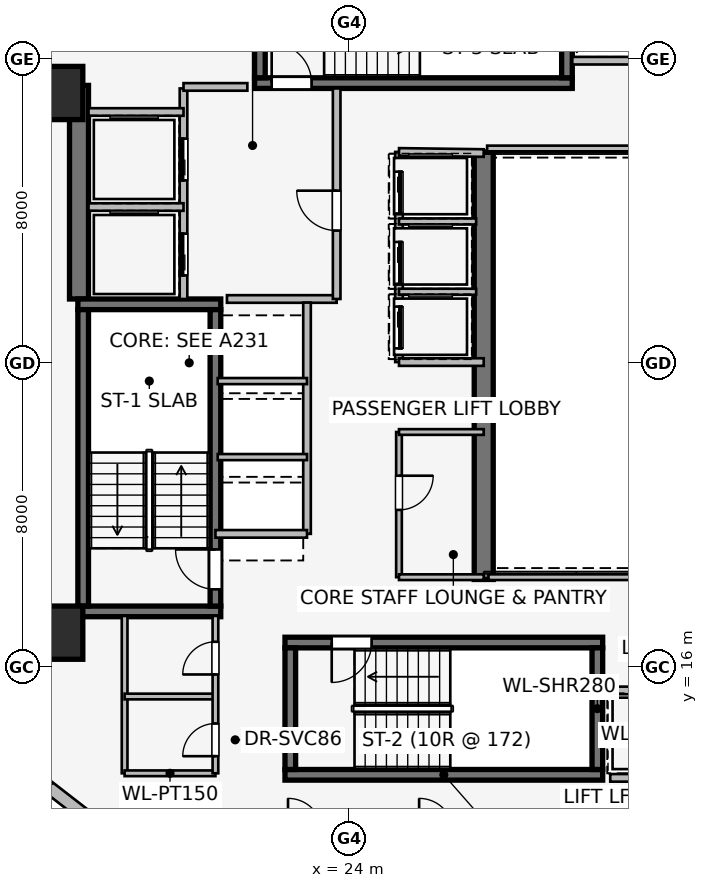
"""IFC4 building model, lengths in metres.
Left out: names, types, materials, properties, quantities, classifications, styles, units other than length and angle.
Written with IfcOpenShell. Run it as: python <this file> out.ifc"""

import sys

from ifc_helpers import new_model, si_unit, direction, frame, frame_2d, origin, origin_2d, place, context, subcontext, project, spatial, rectangle, extrude, element, fill, save


model = new_model("IFC4")
c1 = context("Model", 3, precision=1e-05, world=origin(), true_north=direction((0.0, 1.0)))
c2 = subcontext(c1, "Body", "Model", "MODEL_VIEW")
j1 = project(units=[si_unit("LENGTHUNIT", "METRE"), si_unit("PLANEANGLEUNIT", "RADIAN")], contexts=[c1])
p1 = place(None, origin())
s1 = spatial("IfcSite", under=j1, at=p1, CompositionType="ELEMENT")
p2 = place(p1, origin())
s2 = spatial("IfcBuilding", under=s1, at=p2, CompositionType="ELEMENT")
p3 = place(p2, frame((0.0, 0.0, 111.9)))
s3 = spatial("IfcBuildingStorey", under=s2, at=p3, CompositionType="ELEMENT", Elevation=111.9)
p4 = place(p3, frame((16.9, 25.68, 0.0), z_axis=(0.0, 0.0, 1.0), x_axis=(0.0, 1.0, 0.0)))
e1 = element("IfcWall", 1, at=p4, inside=s3, PredefinedType="SHEAR", context=c2, shape_type="SweptSolid", body=[
    extrude(rectangle(XDim=5.62, YDim=0.5, at=frame_2d((2.81, 0.0))), origin(), (0.0, 0.0, 1.0), 3.45),
])
p5 = place(p3, frame((27.55, 29.55, 0.0), z_axis=(0.0, 0.0, 1.0), x_axis=(0.0, -1.0, 0.0)))
e2 = element("IfcWall", 2, at=p5, inside=s3, PredefinedType="SHEAR", context=c2, shape_type="SweptSolid", body=[
    extrude(rectangle(XDim=11.25, YDim=0.5, at=frame_2d((5.625, 0.0))), origin(), (0.0, 0.0, 1.0), 3.45),
])
for number, where, z_axis, x_axis in (
    (3, (16.87, 17.46, 0.0), (0.0, 0.0, 1.0), (1.0, 0.0, 0.0)),
    (4, (20.63, 25.54, 0.0), (0.0, 0.0, 1.0), (-1.0, 0.0, 0.0)),
):
    element("IfcWall", number, at=place(p3, frame(where, z_axis=z_axis, x_axis=x_axis)), inside=s3, PredefinedType="SHEAR", context=c2, shape_type="SweptSolid", body=[
        extrude(rectangle(XDim=3.76, YDim=0.28, at=frame_2d((1.88, 0.0))), origin(), (0.0, 0.0, 1.0), 3.45),
    ])
p6 = place(p3, frame((17.01, 25.4, 0.0), z_axis=(0.0, 0.0, 1.0), x_axis=(0.0, -1.0, 0.0)))
e5 = element("IfcWall", 5, at=p6, inside=s3, PredefinedType="SHEAR", context=c2, shape_type="SweptSolid", body=[
    extrude(rectangle(XDim=7.8, YDim=0.28, at=frame_2d((3.9, 0.0))), origin(), (0.0, 0.0, 1.0), 3.45),
])
p7 = place(p3, frame((20.49, 17.6, 0.0), z_axis=(0.0, 0.0, 1.0), x_axis=(0.0, 1.0, 0.0)))
e6 = element("IfcWall", 6, at=p7, inside=s3, PredefinedType="SHEAR", context=c2, shape_type="SweptSolid", body=[
    extrude(rectangle(XDim=7.8, YDim=0.28, at=frame_2d((3.9, 0.0))), origin(), (0.0, 0.0, 1.0), 3.45),
])
p8 = place(p7, frame((0.44, 0.0, 0.0)))
e7 = element("IfcOpeningElement", 7, at=p8, cuts=e6, PredefinedType="OPENING", context=c2, shape_type="SweptSolid", body=[
    extrude(rectangle(XDim=1.05, YDim=2.0, at=frame_2d((0.525, 1.0))), frame((0.0, 0.15, 0.0), z_axis=(0.0, -1.0, 0.0), x_axis=(1.0, 0.0, 0.0)), (0.0, 0.0, 1.0), 0.3),
])
p9 = place(p3, frame((22.32, 13.16, 0.0), z_axis=(0.0, 0.0, 1.0), x_axis=(1.0, 0.0, 0.0)))
e8 = element("IfcWall", 8, at=p9, inside=s3, PredefinedType="SHEAR", context=c2, shape_type="SweptSolid", body=[
    extrude(rectangle(XDim=8.36, YDim=0.28, at=frame_2d((4.18, 0.0))), origin(), (0.0, 0.0, 1.0), 3.45),
])
p10 = place(p3, frame((30.68, 16.64, 0.0), z_axis=(0.0, 0.0, 1.0), x_axis=(-1.0, 0.0, 0.0)))
e9 = element("IfcWall", 9, at=p10, inside=s3, PredefinedType="SHEAR", context=c2, shape_type="SweptSolid", body=[
    extrude(rectangle(XDim=8.36, YDim=0.28, at=frame_2d((4.18, 0.0))), origin(), (0.0, 0.0, 1.0), 3.45),
])
p11 = place(p10, frame((6.08, 0.0, 0.0)))
e10 = element("IfcOpeningElement", 10, at=p11, cuts=e9, PredefinedType="OPENING", context=c2, shape_type="SweptSolid", body=[
    extrude(rectangle(XDim=1.05, YDim=2.0, at=frame_2d((0.525, 1.0))), frame((0.0, 0.15, 0.0), z_axis=(0.0, -1.0, 0.0), x_axis=(1.0, 0.0, 0.0)), (0.0, 0.0, 1.0), 0.3),
])
for number, where, z_axis, x_axis in (
    (11, (22.46, 16.5, 0.0), (0.0, 0.0, 1.0), (0.0, -1.0, 0.0)),
    (12, (30.54, 13.3, 0.0), (0.0, 0.0, 1.0), (0.0, 1.0, 0.0)),
):
    element("IfcWall", number, at=place(p3, frame(where, z_axis=z_axis, x_axis=x_axis)), inside=s3, PredefinedType="SHEAR", context=c2, shape_type="SweptSolid", body=[
        extrude(rectangle(XDim=3.2, YDim=0.28, at=frame_2d((1.6, 0.0))), origin(), (0.0, 0.0, 1.0), 3.45),
    ])
p12 = place(p3, frame((21.52, 31.36, 0.0), z_axis=(0.0, 0.0, 1.0), x_axis=(1.0, 0.0, 0.0)))
e13 = element("IfcWall", 13, at=p12, inside=s3, PredefinedType="SHEAR", context=c2, shape_type="SweptSolid", body=[
    extrude(rectangle(XDim=8.36, YDim=0.28, at=frame_2d((4.18, 0.0))), origin(), (0.0, 0.0, 1.0), 3.45),
])
p13 = place(p12, frame((0.45, 0.0, 0.0)))
e14 = element("IfcOpeningElement", 14, at=p13, cuts=e13, PredefinedType="OPENING", context=c2, shape_type="SweptSolid", body=[
    extrude(rectangle(XDim=1.05, YDim=2.0, at=frame_2d((0.525, 1.0))), frame((0.0, 0.15, 0.0), z_axis=(0.0, -1.0, 0.0), x_axis=(1.0, 0.0, 0.0)), (0.0, 0.0, 1.0), 0.3),
])
for number, where, z_axis, x_axis in (
    (15, (21.66, 34.7, 0.0), (0.0, 0.0, 1.0), (0.0, -1.0, 0.0)),
    (16, (29.74, 31.5, 0.0), (0.0, 0.0, 1.0), (0.0, 1.0, 0.0)),
):
    element("IfcWall", number, at=place(p3, frame(where, z_axis=z_axis, x_axis=x_axis)), inside=s3, PredefinedType="SHEAR", context=c2, shape_type="SweptSolid", body=[
        extrude(rectangle(XDim=3.2, YDim=0.28, at=frame_2d((1.6, 0.0))), origin(), (0.0, 0.0, 1.0), 3.45),
    ])
for number, where, z_axis, x_axis in (
    (17, (16.3, 16.9, 0.0), (0.0, 0.0, 1.0), (1.0, 0.0, 0.0)),
    (18, (16.3, 31.1, 0.0), (0.0, 0.0, 1.0), (1.0, 0.0, 0.0)),
):
    element("IfcColumn", number, at=place(p3, frame(where, z_axis=z_axis, x_axis=x_axis)), inside=s3, PredefinedType="COLUMN", context=c2, shape_type="SweptSolid", body=[
        extrude(rectangle(XDim=1.4, YDim=1.4, at=origin_2d()), origin(), (0.0, 0.0, 1.0), 3.45),
    ])
p14 = place(p3, frame((17.243, 11.95, 0.0), z_axis=(0.0, 0.0, 1.0), x_axis=(-0.790621329885, 0.612305408053, 0.0)))
e19 = element("IfcWall", 19, at=p14, inside=s3, PredefinedType="STANDARD", context=c2, shape_type="SweptSolid", body=[
    extrude(rectangle(XDim=1.676, YDim=0.33, at=frame_2d((0.838, 0.0))), origin(), (0.0, 0.0, 1.0), 3.16),
])
p15 = place(p3, frame((19.65, 25.68, 0.0), z_axis=(0.0, 0.0, 1.0), x_axis=(0.0, 1.0, 0.0)))
e20 = element("IfcWall", 20, at=p15, inside=s3, PredefinedType="PARTITIONING", context=c2, shape_type="SweptSolid", body=[
    extrude(rectangle(XDim=5.54, YDim=0.2, at=frame_2d((2.77, 0.0))), origin(), (0.0, 0.0, 1.0), 3.16),
])
p16 = place(p15, frame((0.62, 0.0, 0.0)))
e21 = element("IfcOpeningElement", 21, at=p16, cuts=e20, PredefinedType="OPENING", context=c2, shape_type="SweptSolid", body=[
    extrude(rectangle(XDim=1.1, YDim=2.2, at=frame_2d((0.55, 1.1))), frame((0.0, 0.11, 0.0), z_axis=(0.0, -1.0, 0.0), x_axis=(1.0, 0.0, 0.0)), (0.0, 0.0, 1.0), 0.22),
])
p17 = place(p15, frame((3.12, 0.0, 0.0)))
e22 = element("IfcOpeningElement", 22, at=p17, cuts=e20, PredefinedType="OPENING", context=c2, shape_type="SweptSolid", body=[
    extrude(rectangle(XDim=1.1, YDim=2.2, at=frame_2d((0.55, 1.1))), frame((0.0, 0.11, 0.0), z_axis=(0.0, -1.0, 0.0), x_axis=(1.0, 0.0, 0.0)), (0.0, 0.0, 1.0), 0.22),
])
p18 = place(p3, frame((20.793, 25.68, 0.0), z_axis=(0.0, 0.0, 1.0), x_axis=(1.0, 0.0, 0.0)))
e23 = element("IfcWall", 23, at=p18, inside=s3, PredefinedType="PARTITIONING", context=c2, shape_type="SweptSolid", body=[
    extrude(rectangle(XDim=2.887, YDim=0.2, at=frame_2d((1.443, 0.0))), origin(), (0.0, 0.0, 1.0), 3.16),
])
p19 = place(p3, frame((23.68, 25.68, 0.0), z_axis=(0.0, 0.0, 1.0), x_axis=(0.0, 1.0, 0.0)))
e24 = element("IfcWall", 24, at=p19, inside=s3, PredefinedType="PARTITIONING", context=c2, shape_type="SweptSolid", body=[
    extrude(rectangle(XDim=5.54, YDim=0.2, at=frame_2d((2.77, 0.0))), origin(), (0.0, 0.0, 1.0), 3.16),
])
p20 = place(p19, frame((1.8, 0.0, 0.0)))
e25 = element("IfcOpeningElement", 25, at=p20, cuts=e24, PredefinedType="OPENING", context=c2, shape_type="SweptSolid", body=[
    extrude(rectangle(XDim=1.05, YDim=2.0, at=frame_2d((0.525, 1.0))), frame((0.0, 0.11, 0.0), z_axis=(0.0, -1.0, 0.0), x_axis=(1.0, 0.0, 0.0)), (0.0, 0.0, 1.0), 0.22),
])
p21 = place(p3, frame((21.33, 31.26, 0.0), z_axis=(0.0, 0.0, 1.0), x_axis=(-1.0, 0.0, 0.0)))
e26 = element("IfcWall", 26, at=p21, inside=s3, PredefinedType="PARTITIONING", context=c2, shape_type="SweptSolid", body=[
    extrude(rectangle(XDim=1.68, YDim=0.2, at=frame_2d((0.84, 0.0))), origin(), (0.0, 0.0, 1.0), 3.16),
])
p22 = place(p3, frame((17.15, 28.1, 0.0), z_axis=(0.0, 0.0, 1.0), x_axis=(1.0, 0.0, 0.0)))
e27 = element("IfcWall", 27, at=p22, inside=s3, PredefinedType="PARTITIONING", context=c2, shape_type="SweptSolid", body=[
    extrude(rectangle(XDim=2.5, YDim=0.2, at=frame_2d((1.25, 0.0))), origin(), (0.0, 0.0, 1.0), 3.16),
])
p23 = place(p3, frame((19.65, 30.6, 0.0), z_axis=(0.0, 0.0, 1.0), x_axis=(-1.0, 0.0, 0.0)))
e28 = element("IfcWall", 28, at=p23, inside=s3, PredefinedType="PARTITIONING", context=c2, shape_type="SweptSolid", body=[
    extrude(rectangle(XDim=2.5, YDim=0.2, at=frame_2d((1.25, 0.0))), origin(), (0.0, 0.0, 1.0), 2.06),
])
p24 = place(p3, frame((33.5, 15.38, 0.0), z_axis=(0.0, 0.0, 1.0), x_axis=(-1.0, 0.0, 0.0)))
e29 = element("IfcWall", 29, at=p24, inside=s3, PredefinedType="PARTITIONING", context=c2, shape_type="SweptSolid", body=[
    extrude(rectangle(XDim=2.82, YDim=0.2, at=frame_2d((1.41, 0.0))), origin(), (0.0, 0.0, 1.0), 3.16),
])
p25 = place(p24, frame((0.8, 0.0, 0.0)))
e30 = element("IfcOpeningElement", 30, at=p25, cuts=e29, PredefinedType="OPENING", context=c2, shape_type="SweptSolid", body=[
    extrude(rectangle(XDim=1.2, YDim=2.2, at=frame_2d((0.6, 1.1))), frame((0.0, 0.11, 0.0), z_axis=(0.0, -1.0, 0.0), x_axis=(1.0, 0.0, 0.0)), (0.0, 0.0, 1.0), 0.22),
])
p26 = place(p3, frame((30.879, 13.08, 0.0), z_axis=(0.0, 0.0, 1.0), x_axis=(1.0, 0.0, 0.0)))
e31 = element("IfcWall", 31, at=p26, inside=s3, PredefinedType="PARTITIONING", context=c2, shape_type="SweptSolid", body=[
    extrude(rectangle(XDim=2.621, YDim=0.2, at=frame_2d((1.311, 0.0))), origin(), (0.0, 0.0, 1.0), 3.16),
])
p27 = place(p3, frame((32.48, 31.95, 0.0), z_axis=(0.0, 0.0, 1.0), x_axis=(-1.0, 0.0, 0.0)))
e32 = element("IfcWall", 32, at=p27, inside=s3, PredefinedType="PARTITIONING", context=c2, shape_type="SweptSolid", body=[
    extrude(rectangle(XDim=2.6, YDim=0.2, at=frame_2d((1.3, 0.0))), origin(), (0.0, 0.0, 1.0), 3.16),
])
p28 = place(p3, frame((22.9, 19.5, 0.0), z_axis=(0.0, 0.0, 1.0), x_axis=(0.0, 1.0, 0.0)))
e33 = element("IfcWall", 33, at=p28, inside=s3, PredefinedType="PARTITIONING", context=c2, shape_type="SweptSolid", body=[
    extrude(rectangle(XDim=6.085, YDim=0.2, at=frame_2d((3.042, 0.0))), origin(), (0.0, 0.0, 1.0), 3.16),
])
p29 = place(p3, frame((20.49, 19.5, 0.0), z_axis=(0.0, 0.0, 1.0), x_axis=(1.0, 0.0, 0.0)))
e34 = element("IfcWall", 34, at=p29, inside=s3, PredefinedType="PARTITIONING", context=c2, shape_type="SweptSolid", body=[
    extrude(rectangle(XDim=2.41, YDim=0.2, at=frame_2d((1.205, 0.0))), origin(), (0.0, 0.0, 1.0), 2.06),
])
for number, where, z_axis, x_axis in (
    (35, (20.55, 21.52, 0.0), (0.0, 0.0, 1.0), (1.0, 0.0, 0.0)),
    (36, (20.55, 23.52, 0.0), (0.0, 0.0, 1.0), (1.0, 0.0, 0.0)),
):
    element("IfcWall", number, at=place(p3, frame(where, z_axis=z_axis, x_axis=x_axis)), inside=s3, PredefinedType="PARTITIONING", context=c2, shape_type="SweptSolid", body=[
        extrude(rectangle(XDim=2.35, YDim=0.16, at=frame_2d((1.175, 0.0))), origin(), (0.0, 0.0, 1.0), 3.16),
    ])
p30 = place(p3, frame((25.32, 29.55, 0.0), z_axis=(0.0, 0.0, 1.0), x_axis=(0.0, -1.0, 0.0)))
e37 = element("IfcWall", 37, at=p30, inside=s3, PredefinedType="PARTITIONING", context=c2, shape_type="SweptSolid", body=[
    extrude(rectangle(XDim=5.53, YDim=0.2, at=frame_2d((2.765, 0.0))), origin(), (0.0, 0.0, 1.0), 3.16),
])
p31 = place(p30, frame((0.52, 0.0, 0.0)))
e38 = element("IfcOpeningElement", 38, at=p31, cuts=e37, PredefinedType="OPENING", context=c2, shape_type="SweptSolid", body=[
    extrude(rectangle(XDim=1.1, YDim=2.2, at=frame_2d((0.55, 1.1))), frame((0.0, 0.11, 0.0), z_axis=(0.0, -1.0, 0.0), x_axis=(1.0, 0.0, 0.0)), (0.0, 0.0, 1.0), 0.22),
])
p32 = place(p30, frame((2.37, 0.0, 0.0)))
e39 = element("IfcOpeningElement", 39, at=p32, cuts=e37, PredefinedType="OPENING", context=c2, shape_type="SweptSolid", body=[
    extrude(rectangle(XDim=1.1, YDim=2.2, at=frame_2d((0.55, 1.1))), frame((0.0, 0.11, 0.0), z_axis=(0.0, -1.0, 0.0), x_axis=(1.0, 0.0, 0.0)), (0.0, 0.0, 1.0), 0.22),
])
p33 = place(p30, frame((4.07, 0.0, 0.0)))
e40 = element("IfcOpeningElement", 40, at=p33, cuts=e37, PredefinedType="OPENING", context=c2, shape_type="SweptSolid", body=[
    extrude(rectangle(XDim=1.1, YDim=2.2, at=frame_2d((0.55, 1.1))), frame((0.0, 0.11, 0.0), z_axis=(0.0, -1.0, 0.0), x_axis=(1.0, 0.0, 0.0)), (0.0, 0.0, 1.0), 0.22),
])
p34 = place(p3, frame((27.55, 29.52, 0.0), z_axis=(0.0, 0.0, 1.0), x_axis=(-0.999909343457, 0.013464949556, 0.0)))
e41 = element("IfcWall", 41, at=p34, inside=s3, PredefinedType="PARTITIONING", context=c2, shape_type="SweptSolid", body=[
    extrude(rectangle(XDim=2.23, YDim=0.2, at=frame_2d((1.115, 0.0))), origin(), (0.0, 0.0, 1.0), 2.06),
])
p35 = place(p3, frame((25.32, 24.02, 0.0), z_axis=(0.0, 0.0, 1.0), x_axis=(1.0, 0.0, 0.0)))
e42 = element("IfcWall", 42, at=p35, inside=s3, PredefinedType="PARTITIONING", context=c2, shape_type="SweptSolid", body=[
    extrude(rectangle(XDim=2.23, YDim=0.2, at=frame_2d((1.115, 0.0))), origin(), (0.0, 0.0, 1.0), 3.16),
])
for number, where, z_axis, x_axis in (
    (43, (25.32, 25.87, 0.0), (0.0, 0.0, 1.0), (1.0, 0.0, 0.0)),
    (44, (25.32, 27.72, 0.0), (0.0, 0.0, 1.0), (1.0, 0.0, 0.0)),
):
    element("IfcWall", number, at=place(p3, frame(where, z_axis=z_axis, x_axis=x_axis)), inside=s3, PredefinedType="PARTITIONING", context=c2, shape_type="SweptSolid", body=[
        extrude(rectangle(XDim=2.03, YDim=0.16, at=frame_2d((1.015, 0.0))), origin(), (0.0, 0.0, 1.0), 3.16),
    ])
p36 = place(p3, frame((25.32, 22.18, 0.0), z_axis=(0.0, 0.0, 1.0), x_axis=(0.0, -1.0, 0.0)))
e45 = element("IfcWall", 45, at=p36, inside=s3, PredefinedType="PARTITIONING", context=c2, shape_type="SweptSolid", body=[
    extrude(rectangle(XDim=3.82, YDim=0.15, at=frame_2d((1.91, 0.0))), origin(), (0.0, 0.0, 1.0), 3.16),
])
p37 = place(p36, frame((1.15, 0.0, 0.0)))
e46 = element("IfcOpeningElement", 46, at=p37, cuts=e45, PredefinedType="OPENING", context=c2, shape_type="SweptSolid", body=[
    extrude(rectangle(XDim=0.9, YDim=2.0, at=frame_2d((0.45, 1.0))), frame((0.0, 0.085, 0.0), z_axis=(0.0, -1.0, 0.0), x_axis=(1.0, 0.0, 0.0)), (0.0, 0.0, 1.0), 0.17),
])
for number, where, z_axis, x_axis in (
    (47, (25.32, 22.18, 0.0), (0.0, 0.0, 1.0), (1.0, 0.0, 0.0)),
    (48, (25.32, 18.36, 0.0), (0.0, 0.0, 1.0), (1.0, 0.0, 0.0)),
):
    element("IfcWall", number, at=place(p3, frame(where, z_axis=z_axis, x_axis=x_axis)), inside=s3, PredefinedType="PARTITIONING", context=c2, shape_type="SweptSolid", body=[
        extrude(rectangle(XDim=2.23, YDim=0.15, at=frame_2d((1.115, 0.0))), origin(), (0.0, 0.0, 1.0), 3.16),
    ])
p38 = place(p3, frame((18.1, 17.34, 0.0), z_axis=(0.0, 0.0, 1.0), x_axis=(0.0, -1.0, 0.0)))
e49 = element("IfcWall", 49, at=p38, inside=s3, PredefinedType="PARTITIONING", context=c2, shape_type="SweptSolid", body=[
    extrude(rectangle(XDim=4.14, YDim=0.15, at=frame_2d((2.07, 0.0))), origin(), (0.0, 0.0, 1.0), 3.16),
])
for number, where, z_axis, x_axis in (
    (50, (18.1, 13.2, 0.0), (0.0, 0.0, 1.0), (1.0, 0.0, 0.0)),
    (51, (18.1, 15.22, 0.0), (0.0, 0.0, 1.0), (1.0, 0.0, 0.0)),
):
    element("IfcWall", number, at=place(p3, frame(where, z_axis=z_axis, x_axis=x_axis)), inside=s3, PredefinedType="PARTITIONING", context=c2, shape_type="SweptSolid", body=[
        extrude(rectangle(XDim=2.39, YDim=0.15, at=frame_2d((1.195, 0.0))), origin(), (0.0, 0.0, 1.0), 3.16),
    ])
p39 = place(p3, frame((20.49, 13.2, 0.0), z_axis=(0.0, 0.0, 1.0), x_axis=(0.0, 1.0, 0.0)))
e52 = element("IfcWall", 52, at=p39, inside=s3, PredefinedType="PARTITIONING", context=c2, shape_type="SweptSolid", body=[
    extrude(rectangle(XDim=4.14, YDim=0.15, at=frame_2d((2.07, 0.0))), origin(), (0.0, 0.0, 1.0), 3.16),
])
p40 = place(p39, frame((0.45, 0.0, 0.0)))
e53 = element("IfcOpeningElement", 53, at=p40, cuts=e52, PredefinedType="OPENING", context=c2, shape_type="SweptSolid", body=[
    extrude(rectangle(XDim=0.86, YDim=2.0, at=frame_2d((0.43, 1.0))), frame((0.0, 0.085, 0.0), z_axis=(0.0, -1.0, 0.0), x_axis=(1.0, 0.0, 0.0)), (0.0, 0.0, 1.0), 0.17),
])
p41 = place(p39, frame((2.6, 0.0, 0.0)))
e54 = element("IfcOpeningElement", 54, at=p41, cuts=e52, PredefinedType="OPENING", context=c2, shape_type="SweptSolid", body=[
    extrude(rectangle(XDim=0.86, YDim=2.0, at=frame_2d((0.43, 1.0))), frame((0.0, 0.085, 0.0), z_axis=(0.0, -1.0, 0.0), x_axis=(1.0, 0.0, 0.0)), (0.0, 0.0, 1.0), 0.17),
])
p42 = place(p3, frame((27.675, 18.36, 0.0), z_axis=(0.0, 0.0, 1.0), x_axis=(1.0, 0.0, 0.0)))
e55 = element("IfcWall", 55, at=p42, inside=s3, PredefinedType="PARTITIONING", context=c2, shape_type="SweptSolid", body=[
    extrude(rectangle(XDim=12.165, YDim=0.15, at=frame_2d((6.083, 0.0))), origin(), (0.0, 0.0, 1.0), 2.301),
])
p43 = place(p3, frame((39.84, 29.64, 0.0), z_axis=(0.0, 0.0, 1.0), x_axis=(-1.0, 0.0, 0.0)))
e56 = element("IfcWall", 56, at=p43, inside=s3, PredefinedType="PARTITIONING", context=c2, shape_type="SweptSolid", body=[
    extrude(rectangle(XDim=12.2, YDim=0.15, at=frame_2d((6.1, 0.0))), origin(), (0.0, 0.0, 1.0), 2.301),
])
p44 = place(p8, origin())
e57 = element("IfcDoor", 57, at=p44, inside=s3, OperationType="SINGLE_SWING_RIGHT", PredefinedType="DOOR", context=c2, shape_type="SweptSolid", body=[
    extrude(rectangle(XDim=1.05, YDim=2.0, at=frame_2d((0.525, 1.0))), frame((0.0, 0.025, 0.0), z_axis=(0.0, -1.0, 0.0), x_axis=(1.0, 0.0, 0.0)), (0.0, 0.0, 1.0), 0.05),
])
fill(e7, e57)
p45 = place(p11, origin())
e58 = element("IfcDoor", 58, at=p45, inside=s3, OperationType="SINGLE_SWING_RIGHT", PredefinedType="DOOR", context=c2, shape_type="SweptSolid", body=[
    extrude(rectangle(XDim=1.05, YDim=2.0, at=frame_2d((0.525, 1.0))), frame((0.0, 0.025, 0.0), z_axis=(0.0, -1.0, 0.0), x_axis=(1.0, 0.0, 0.0)), (0.0, 0.0, 1.0), 0.05),
])
fill(e10, e58)
p46 = place(p13, origin())
e59 = element("IfcDoor", 59, at=p46, inside=s3, OperationType="SINGLE_SWING_LEFT", PredefinedType="DOOR", context=c2, shape_type="SweptSolid", body=[
    extrude(rectangle(XDim=1.05, YDim=2.0, at=frame_2d((0.525, 1.0))), frame((0.0, 0.025, 0.0), z_axis=(0.0, -1.0, 0.0), x_axis=(1.0, 0.0, 0.0)), (0.0, 0.0, 1.0), 0.05),
])
fill(e14, e59)
p47 = place(p16, origin())
e60 = element("IfcDoor", 60, at=p47, inside=s3, OperationType="SLIDING_TO_LEFT", PredefinedType="DOOR", context=c2, shape_type="SweptSolid", body=[
    extrude(rectangle(XDim=1.1, YDim=2.2, at=frame_2d((0.55, 1.1))), frame((0.0, 0.025, 0.0), z_axis=(0.0, -1.0, 0.0), x_axis=(1.0, 0.0, 0.0)), (0.0, 0.0, 1.0), 0.05),
])
fill(e21, e60)
p48 = place(p17, origin())
e61 = element("IfcDoor", 61, at=p48, inside=s3, OperationType="SLIDING_TO_LEFT", PredefinedType="DOOR", context=c2, shape_type="SweptSolid", body=[
    extrude(rectangle(XDim=1.1, YDim=2.2, at=frame_2d((0.55, 1.1))), frame((0.0, 0.025, 0.0), z_axis=(0.0, -1.0, 0.0), x_axis=(1.0, 0.0, 0.0)), (0.0, 0.0, 1.0), 0.05),
])
fill(e22, e61)
p49 = place(p20, origin())
e62 = element("IfcDoor", 62, at=p49, inside=s3, OperationType="SINGLE_SWING_RIGHT", PredefinedType="DOOR", context=c2, shape_type="SweptSolid", body=[
    extrude(rectangle(XDim=1.05, YDim=2.0, at=frame_2d((0.525, 1.0))), frame((0.0, 0.025, 0.0), z_axis=(0.0, -1.0, 0.0), x_axis=(1.0, 0.0, 0.0)), (0.0, 0.0, 1.0), 0.05),
])
fill(e25, e62)
p50 = place(p31, origin())
e63 = element("IfcDoor", 63, at=p50, inside=s3, OperationType="SLIDING_TO_LEFT", PredefinedType="DOOR", context=c2, shape_type="SweptSolid", body=[
    extrude(rectangle(XDim=1.1, YDim=2.2, at=frame_2d((0.55, 1.1))), frame((0.0, 0.025, 0.0), z_axis=(0.0, -1.0, 0.0), x_axis=(1.0, 0.0, 0.0)), (0.0, 0.0, 1.0), 0.05),
])
fill(e38, e63)
p51 = place(p32, origin())
e64 = element("IfcDoor", 64, at=p51, inside=s3, OperationType="SLIDING_TO_LEFT", PredefinedType="DOOR", context=c2, shape_type="SweptSolid", body=[
    extrude(rectangle(XDim=1.1, YDim=2.2, at=frame_2d((0.55, 1.1))), frame((0.0, 0.025, 0.0), z_axis=(0.0, -1.0, 0.0), x_axis=(1.0, 0.0, 0.0)), (0.0, 0.0, 1.0), 0.05),
])
fill(e39, e64)
p52 = place(p33, origin())
e65 = element("IfcDoor", 65, at=p52, inside=s3, OperationType="SLIDING_TO_LEFT", PredefinedType="DOOR", context=c2, shape_type="SweptSolid", body=[
    extrude(rectangle(XDim=1.1, YDim=2.2, at=frame_2d((0.55, 1.1))), frame((0.0, 0.025, 0.0), z_axis=(0.0, -1.0, 0.0), x_axis=(1.0, 0.0, 0.0)), (0.0, 0.0, 1.0), 0.05),
])
fill(e40, e65)
p53 = place(p37, origin())
e66 = element("IfcDoor", 66, at=p53, inside=s3, OperationType="SINGLE_SWING_LEFT", PredefinedType="DOOR", context=c2, shape_type="SweptSolid", body=[
    extrude(rectangle(XDim=0.9, YDim=2.0, at=frame_2d((0.45, 1.0))), frame((0.0, 0.025, 0.0), z_axis=(0.0, -1.0, 0.0), x_axis=(1.0, 0.0, 0.0)), (0.0, 0.0, 1.0), 0.05),
])
fill(e46, e66)
p54 = place(p40, origin())
e67 = element("IfcDoor", 67, at=p54, inside=s3, OperationType="SINGLE_SWING_LEFT", PredefinedType="DOOR", context=c2, shape_type="SweptSolid", body=[
    extrude(rectangle(XDim=0.86, YDim=2.0, at=frame_2d((0.43, 1.0))), frame((0.0, 0.025, 0.0), z_axis=(0.0, -1.0, 0.0), x_axis=(1.0, 0.0, 0.0)), (0.0, 0.0, 1.0), 0.05),
])
fill(e53, e67)
p55 = place(p41, origin())
e68 = element("IfcDoor", 68, at=p55, inside=s3, OperationType="SINGLE_SWING_LEFT", PredefinedType="DOOR", context=c2, shape_type="SweptSolid", body=[
    extrude(rectangle(XDim=0.86, YDim=2.0, at=frame_2d((0.43, 1.0))), frame((0.0, 0.025, 0.0), z_axis=(0.0, -1.0, 0.0), x_axis=(1.0, 0.0, 0.0)), (0.0, 0.0, 1.0), 0.05),
])
fill(e54, e68)
save(model, sys.argv[1])
